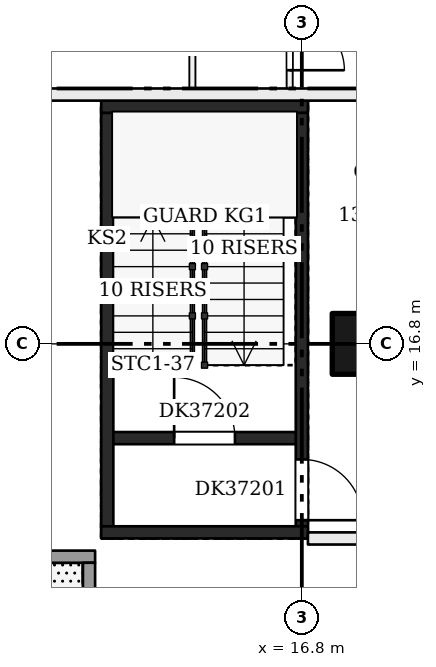
"""IFC4 building model, lengths in metres.
Left out: names, types, materials, properties, quantities, classifications, styles, units other than length and angle.
Written with IfcOpenShell. Run it as: python <this file> out.ifc"""

import sys

from ifc_helpers import new_model, si_unit, direction, frame, frame_2d, origin, origin_2d, place, context, subcontext, project, spatial, rectangle, extrude, element, fill, save


model = new_model("IFC4")
c1 = context("Model", 3, precision=1e-05, world=origin(), true_north=direction((0.0, 1.0)))
c2 = subcontext(c1, "Body", "Model", "MODEL_VIEW")
j1 = project(units=[si_unit("LENGTHUNIT", "METRE"), si_unit("PLANEANGLEUNIT", "RADIAN")], contexts=[c1])
p1 = place(None, origin())
s1 = spatial("IfcSite", under=j1, at=p1, CompositionType="ELEMENT")
p2 = place(p1, origin())
s2 = spatial("IfcBuilding", under=s1, at=p2, CompositionType="ELEMENT")
p3 = place(p2, frame((0.0, 0.0, 147.7)))
s3 = spatial("IfcBuildingStorey", under=s2, at=p3, CompositionType="ELEMENT", Elevation=147.7)
p4 = place(p3, frame((17.8, 16.8, 0.0), z_axis=(0.0, 0.0, 1.0), x_axis=(1.0, 0.0, 0.0)))
e1 = element("IfcColumn", 1, at=p4, inside=s3, PredefinedType="COLUMN", context=c2, shape_type="SweptSolid", body=[
    extrude(rectangle(XDim=1.0, YDim=1.0, at=origin_2d()), origin(), (0.0, 0.0, 1.0), 3.22),
])
p5 = place(p3, frame((13.6, 13.8, 0.0), z_axis=(0.0, 0.0, 1.0), x_axis=(0.0, 1.0, 0.0)))
e2 = element("IfcWall", 2, at=p5, inside=s3, PredefinedType="SHEAR", context=c2, shape_type="SweptSolid", body=[
    extrude(rectangle(XDim=6.8, YDim=0.2, at=frame_2d((3.4, 0.0))), origin(), (0.0, 0.0, 1.0), 3.22),
])
p6 = place(p3, frame((16.8, 13.8, 0.0), z_axis=(0.0, 0.0, 1.0), x_axis=(0.0, 1.0, 0.0)))
e3 = element("IfcWall", 3, at=p6, inside=s3, PredefinedType="SHEAR", context=c2, shape_type="SweptSolid", body=[
    extrude(rectangle(XDim=6.8, YDim=0.2, at=frame_2d((3.4, 0.0))), origin(), (0.0, 0.0, 1.0), 3.22),
])
p7 = place(p6, frame((0.1, 0.0, 0.0)))
e4 = element("IfcOpeningElement", 4, at=p7, cuts=e3, PredefinedType="OPENING", context=c2, shape_type="SweptSolid", body=[
    extrude(rectangle(XDim=1.0, YDim=2.1, at=frame_2d((0.5, 1.05))), frame((0.0, 0.11, 0.0), z_axis=(0.0, -1.0, 0.0), x_axis=(1.0, 0.0, 0.0)), (0.0, 0.0, 1.0), 0.22),
])
for number, where, z_axis, x_axis in (
    (5, (13.5, 13.7, 0.0), (0.0, 0.0, 1.0), (1.0, 0.0, 0.0)),
    (6, (13.5, 20.7, 0.0), (0.0, 0.0, 1.0), (1.0, 0.0, 0.0)),
):
    element("IfcWall", number, at=place(p3, frame(where, z_axis=z_axis, x_axis=x_axis)), inside=s3, PredefinedType="SHEAR", context=c2, shape_type="SweptSolid", body=[
        extrude(rectangle(XDim=3.4, YDim=0.2, at=frame_2d((1.7, 0.0))), origin(), (0.0, 0.0, 1.0), 3.22),
    ])
p8 = place(p3, frame((13.7, 15.25, 0.0), z_axis=(0.0, 0.0, 1.0), x_axis=(1.0, 0.0, 0.0)))
e7 = element("IfcWall", 7, at=p8, inside=s3, PredefinedType="SHEAR", context=c2, shape_type="SweptSolid", body=[
    extrude(rectangle(XDim=3.0, YDim=0.2, at=frame_2d((1.5, 0.0))), origin(), (0.0, 0.0, 1.0), 3.22),
])
p9 = place(p8, frame((1.0, 0.0, 0.0)))
e8 = element("IfcOpeningElement", 8, at=p9, cuts=e7, PredefinedType="OPENING", context=c2, shape_type="SweptSolid", body=[
    extrude(rectangle(XDim=1.0, YDim=2.1, at=frame_2d((0.5, 1.05))), frame((0.0, 0.11, 0.0), z_axis=(0.0, -1.0, 0.0), x_axis=(1.0, 0.0, 0.0)), (0.0, 0.0, 1.0), 0.22),
])
p10 = place(p3, frame((16.9, 13.6, 0.0), z_axis=(0.0, 0.0, 1.0), x_axis=(1.0, 0.0, 0.0)))
e9 = element("IfcWall", 9, at=p10, inside=s3, PredefinedType="PARTITIONING", context=c2, shape_type="SweptSolid", body=[
    extrude(rectangle(XDim=4.2, YDim=0.2, at=frame_2d((2.1, 0.0))), origin(), (0.0, 0.0, 1.0), 3.22),
])
p11 = place(p10, frame((1.6, 0.0, 0.0)))
e10 = element("IfcOpeningElement", 10, at=p11, cuts=e9, PredefinedType="OPENING", context=c2, shape_type="SweptSolid", body=[
    extrude(rectangle(XDim=1.0, YDim=2.1, at=frame_2d((0.5, 1.05))), frame((0.0, 0.11, 0.0), z_axis=(0.0, -1.0, 0.0), x_axis=(1.0, 0.0, 0.0)), (0.0, 0.0, 1.0), 0.22),
])
p12 = place(p3, frame((10.9, 20.9, 0.0), z_axis=(0.0, 0.0, 1.0), x_axis=(1.0, 0.0, 0.0)))
e11 = element("IfcWall", 11, at=p12, inside=s3, PredefinedType="PARTITIONING", context=c2, shape_type="SweptSolid", body=[
    extrude(rectangle(XDim=8.3, YDim=0.2, at=frame_2d((4.15, 0.0))), origin(), (0.0, 0.0, 1.0), 3.22),
])
p13 = place(p3, frame((15.0, 21.0, 0.0), z_axis=(0.0, 0.0, 1.0), x_axis=(0.0, 1.0, 0.0)))
e12 = element("IfcWall", 12, at=p13, inside=s3, PredefinedType="PARTITIONING", context=c2, shape_type="SweptSolid", body=[
    extrude(rectangle(XDim=19.0, YDim=0.1, at=frame_2d((9.5, 0.0))), origin(), (0.0, 0.0, 1.0), 3.22),
])
p14 = place(p13, frame((1.6, 0.0, 0.0)))
e13 = element("IfcOpeningElement", 13, at=p14, cuts=e12, PredefinedType="OPENING", context=c2, shape_type="SweptSolid", body=[
    extrude(rectangle(XDim=0.9, YDim=2.1, at=frame_2d((0.45, 1.05))), frame((0.0, 0.06, 0.0), z_axis=(0.0, -1.0, 0.0), x_axis=(1.0, 0.0, 0.0)), (0.0, 0.0, 1.0), 0.12),
])
p15 = place(p13, frame((5.8, 0.0, 0.0)))
e14 = element("IfcOpeningElement", 14, at=p15, cuts=e12, PredefinedType="OPENING", context=c2, shape_type="SweptSolid", body=[
    extrude(rectangle(XDim=0.9, YDim=2.1, at=frame_2d((0.45, 1.05))), frame((0.0, 0.06, 0.0), z_axis=(0.0, -1.0, 0.0), x_axis=(1.0, 0.0, 0.0)), (0.0, 0.0, 1.0), 0.12),
])
p16 = place(p13, frame((10.0, 0.0, 0.0)))
e15 = element("IfcOpeningElement", 15, at=p16, cuts=e12, PredefinedType="OPENING", context=c2, shape_type="SweptSolid", body=[
    extrude(rectangle(XDim=0.9, YDim=2.1, at=frame_2d((0.45, 1.05))), frame((0.0, 0.06, 0.0), z_axis=(0.0, -1.0, 0.0), x_axis=(1.0, 0.0, 0.0)), (0.0, 0.0, 1.0), 0.12),
])
p17 = place(p13, frame((15.4, 0.0, 0.0)))
e16 = element("IfcOpeningElement", 16, at=p17, cuts=e12, PredefinedType="OPENING", context=c2, shape_type="SweptSolid", body=[
    extrude(rectangle(XDim=0.9, YDim=2.1, at=frame_2d((0.45, 1.05))), frame((0.0, 0.06, 0.0), z_axis=(0.0, -1.0, 0.0), x_axis=(1.0, 0.0, 0.0)), (0.0, 0.0, 1.0), 0.12),
])
p18 = place(p3, frame((16.6, 21.0, 0.0), z_axis=(0.0, 0.0, 1.0), x_axis=(0.0, 1.0, 0.0)))
e17 = element("IfcWall", 17, at=p18, inside=s3, PredefinedType="PARTITIONING", context=c2, shape_type="SweptSolid", body=[
    extrude(rectangle(XDim=8.3, YDim=0.1, at=frame_2d((4.15, 0.0))), origin(), (0.0, 0.0, 1.0), 3.22),
])
p19 = place(p18, frame((2.2, 0.0, 0.0)))
e18 = element("IfcOpeningElement", 18, at=p19, cuts=e17, PredefinedType="OPENING", context=c2, shape_type="SweptSolid", body=[
    extrude(rectangle(XDim=0.9, YDim=2.1, at=frame_2d((0.45, 1.05))), frame((0.0, 0.06, 0.0), z_axis=(0.0, -1.0, 0.0), x_axis=(1.0, 0.0, 0.0)), (0.0, 0.0, 1.0), 0.12),
])
p20 = place(p18, frame((0.3, 0.0, 0.0)))
e19 = element("IfcOpeningElement", 19, at=p20, cuts=e17, PredefinedType="OPENING", context=c2, shape_type="SweptSolid", body=[
    extrude(rectangle(XDim=0.9, YDim=2.1, at=frame_2d((0.45, 1.05))), frame((0.0, 0.06, 0.0), z_axis=(0.0, -1.0, 0.0), x_axis=(1.0, 0.0, 0.0)), (0.0, 0.0, 1.0), 0.12),
])
p21 = place(p18, frame((4.863, 0.0, 0.0)))
e20 = element("IfcOpeningElement", 20, at=p21, cuts=e17, PredefinedType="OPENING", context=c2, shape_type="SweptSolid", body=[
    extrude(rectangle(XDim=0.9, YDim=2.1, at=frame_2d((0.45, 1.05))), frame((0.0, 0.06, 0.0), z_axis=(0.0, -1.0, 0.0), x_axis=(1.0, 0.0, 0.0)), (0.0, 0.0, 1.0), 0.12),
])
p22 = place(p18, frame((6.825, 0.0, 0.0)))
e21 = element("IfcOpeningElement", 21, at=p22, cuts=e17, PredefinedType="OPENING", context=c2, shape_type="SweptSolid", body=[
    extrude(rectangle(XDim=0.9, YDim=2.1, at=frame_2d((0.45, 1.05))), frame((0.0, 0.06, 0.0), z_axis=(0.0, -1.0, 0.0), x_axis=(1.0, 0.0, 0.0)), (0.0, 0.0, 1.0), 0.12),
])
p23 = place(p3, frame((10.8, 13.3, 0.0), z_axis=(0.0, 0.0, 1.0), x_axis=(1.0, 0.0, 0.0)))
e22 = element("IfcWall", 22, at=p23, inside=s3, PredefinedType="SOLIDWALL", context=c2, shape_type="SweptSolid", body=[
    extrude(rectangle(XDim=2.6, YDim=0.2, at=frame_2d((1.3, 0.0))), origin(), (0.0, 0.0, 1.0), 3.22),
])
p24 = place(p3, frame((13.3, 13.2, 0.0), z_axis=(0.0, 0.0, 1.0), x_axis=(0.0, -1.0, 0.0)))
e23 = element("IfcWall", 23, at=p24, inside=s3, PredefinedType="SOLIDWALL", context=c2, shape_type="SweptSolid", body=[
    extrude(rectangle(XDim=2.2, YDim=0.2, at=frame_2d((1.1, 0.0))), origin(), (0.0, 0.0, 1.0), 3.22),
])
p25 = place(p7, frame((1.0, 0.0, 0.0), z_axis=(0.0, 0.0, 1.0), x_axis=(-1.0, 0.0, 0.0)))
e24 = element("IfcDoor", 24, at=p25, inside=s3, OperationType="SINGLE_SWING_RIGHT", PredefinedType="DOOR", context=c2, shape_type="SweptSolid", body=[
    extrude(rectangle(XDim=1.0, YDim=2.1, at=frame_2d((0.5, 1.05))), frame((0.0, 0.025, 0.0), z_axis=(0.0, -1.0, 0.0), x_axis=(1.0, 0.0, 0.0)), (0.0, 0.0, 1.0), 0.05),
])
fill(e4, e24)
p26 = place(p9, origin())
e25 = element("IfcDoor", 25, at=p26, inside=s3, OperationType="SINGLE_SWING_LEFT", PredefinedType="DOOR", context=c2, shape_type="SweptSolid", body=[
    extrude(rectangle(XDim=1.0, YDim=2.1, at=frame_2d((0.5, 1.05))), frame((0.0, 0.025, 0.0), z_axis=(0.0, -1.0, 0.0), x_axis=(1.0, 0.0, 0.0)), (0.0, 0.0, 1.0), 0.05),
])
fill(e8, e25)
p27 = place(p20, frame((0.9, 0.0, 0.0), z_axis=(0.0, 0.0, 1.0), x_axis=(-1.0, 0.0, 0.0)))
e26 = element("IfcDoor", 26, at=p27, inside=s3, OperationType="SINGLE_SWING_RIGHT", PredefinedType="DOOR", context=c2, shape_type="SweptSolid", body=[
    extrude(rectangle(XDim=0.9, YDim=2.1, at=frame_2d((0.45, 1.05))), frame((0.0, 0.025, 0.0), z_axis=(0.0, -1.0, 0.0), x_axis=(1.0, 0.0, 0.0)), (0.0, 0.0, 1.0), 0.05),
])
fill(e19, e26)
save(model, sys.argv[1])
